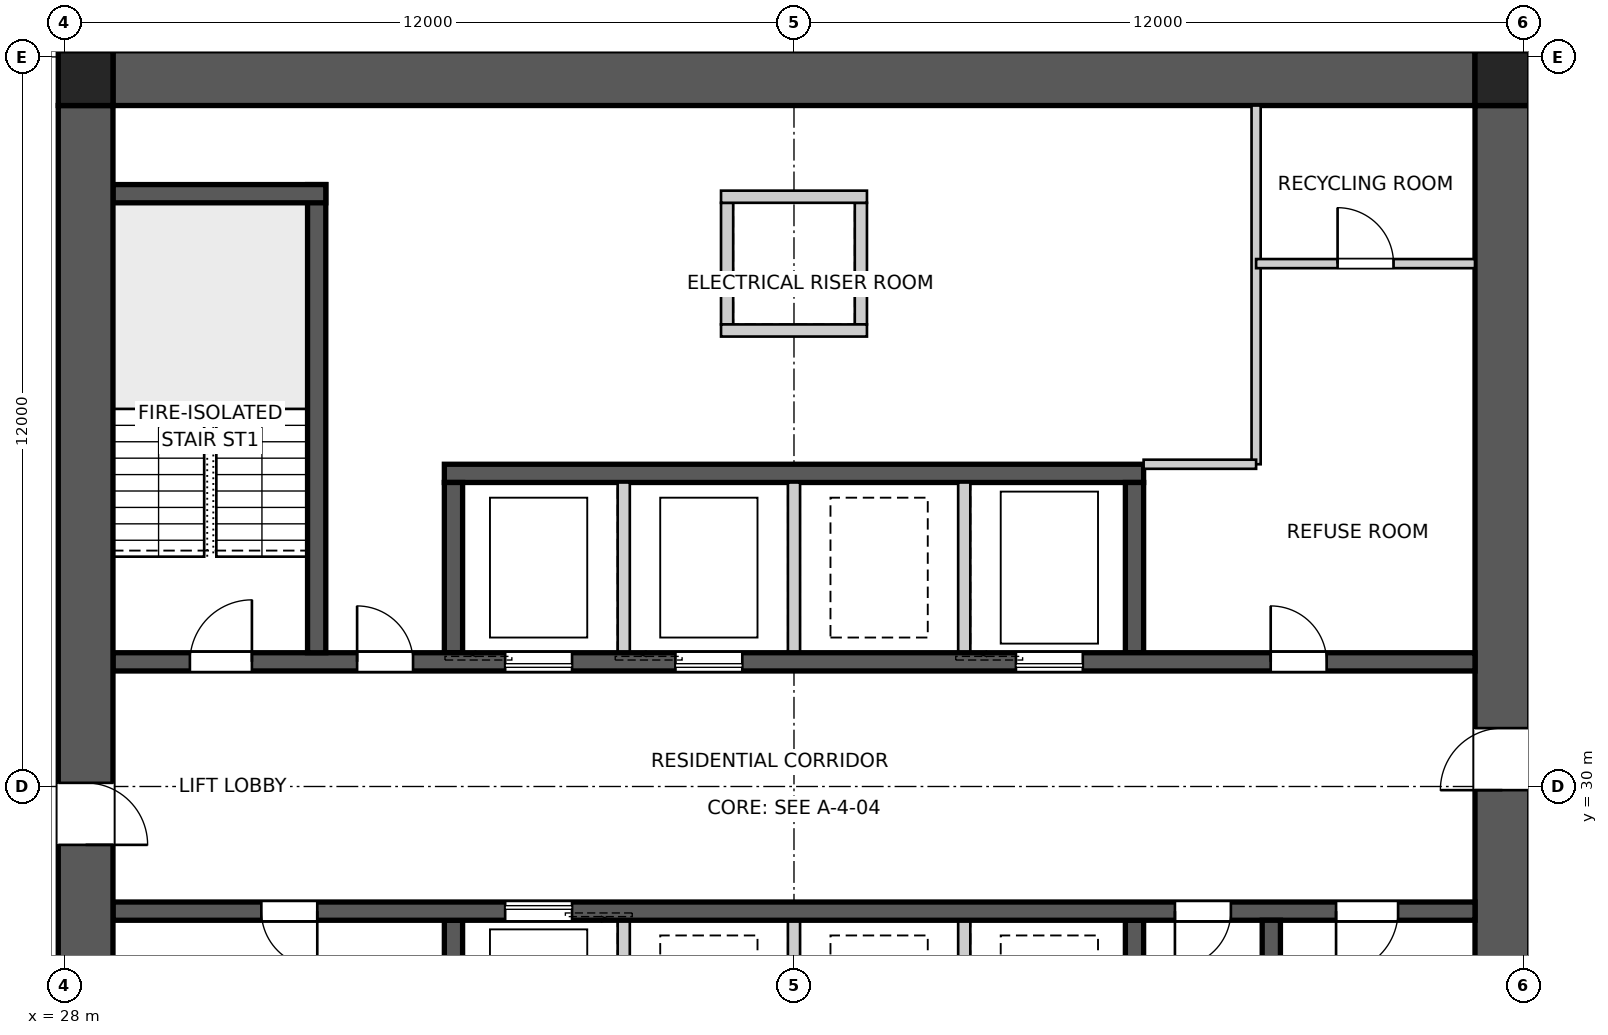
"""IFC4 building model, lengths in metres.
Left out: names, types, materials, properties, quantities, classifications, styles, units other than length and angle.
Written with IfcOpenShell. Run it as: python <this file> out.ifc"""

import sys

from ifc_helpers import new_model, si_unit, direction, frame, frame_2d, origin, origin_2d, place, context, subcontext, project, spatial, polyline, rectangle, outline, extrude, element, fill, save


model = new_model("IFC4")
c1 = context("Model", 3, precision=1e-05, world=origin(), true_north=direction((0.0, 1.0)))
c2 = subcontext(c1, "Body", "Model", "MODEL_VIEW")
j1 = project(units=[si_unit("LENGTHUNIT", "METRE"), si_unit("PLANEANGLEUNIT", "RADIAN")], contexts=[c1])
p1 = place(None, origin())
s1 = spatial("IfcSite", under=j1, at=p1, CompositionType="ELEMENT")
p2 = place(p1, origin())
s2 = spatial("IfcBuilding", under=s1, at=p2, CompositionType="ELEMENT")
p3 = place(p2, frame((0.0, 0.0, 67.6)))
s3 = spatial("IfcBuildingStorey", under=s2, at=p3, CompositionType="ELEMENT", Elevation=67.6)
p4 = place(p3, frame((28.8, 41.65, 0.0), z_axis=(0.0, 0.0, 1.0), x_axis=(1.0, 0.0, 0.0)))
e1 = element("IfcWall", 1, at=p4, inside=s3, PredefinedType="SHEAR", context=c2, shape_type="SweptSolid", body=[
    extrude(outline(polyline([(0.0, -0.45), (22.4, -0.45), (22.4, -0.025), (22.85, -0.025), (22.85, 0.025), (22.4, 0.025), (22.4, 0.45), (0.0, 0.45), (0.0, 0.025), (-0.45, 0.025), (-0.45, -0.025), (0.0, -0.025), (0.0, -0.45)])), origin(), (0.0, 0.0, 1.0), 3.4),
])
p5 = place(p3, frame((51.65, 18.8, 0.0), z_axis=(0.0, 0.0, 1.0), x_axis=(0.0, 1.0, 0.0)))
e2 = element("IfcWall", 2, at=p5, inside=s3, PredefinedType="SHEAR", context=c2, shape_type="SweptSolid", body=[
    extrude(outline(polyline([(0.0, -0.45), (22.4, -0.45), (22.4, -0.025), (22.85, -0.025), (22.85, 0.025), (22.4, 0.025), (22.4, 0.45), (0.0, 0.45), (0.0, 0.025), (-0.45, 0.025), (-0.45, -0.025), (0.0, -0.025), (0.0, -0.45)])), origin(), (0.0, 0.0, 1.0), 3.4),
])
p6 = place(p5, frame((11.14, 0.0, 0.0)))
e3 = element("IfcOpeningElement", 3, at=p6, cuts=e2, PredefinedType="OPENING", context=c2, shape_type="SweptSolid", body=[
    extrude(rectangle(XDim=1.02, YDim=2.4, at=frame_2d((0.51, 1.2))), frame((0.0, 0.46, 0.0), z_axis=(0.0, -1.0, 0.0), x_axis=(1.0, 0.0, 0.0)), (0.0, 0.0, 1.0), 0.92),
])
p7 = place(p3, frame((28.35, 41.2, 0.0), z_axis=(0.0, 0.0, 1.0), x_axis=(0.0, -1.0, 0.0)))
e4 = element("IfcWall", 4, at=p7, inside=s3, PredefinedType="SHEAR", context=c2, shape_type="SweptSolid", body=[
    extrude(outline(polyline([(0.0, -0.45), (22.4, -0.45), (22.4, -0.025), (22.85, -0.025), (22.85, 0.025), (22.4, 0.025), (22.4, 0.45), (0.0, 0.45), (0.0, 0.025), (-0.45, 0.025), (-0.45, -0.025), (0.0, -0.025), (0.0, -0.45)])), origin(), (0.0, 0.0, 1.0), 3.4),
])
p8 = place(p7, frame((11.14, 0.0, 0.0)))
e5 = element("IfcOpeningElement", 5, at=p8, cuts=e4, PredefinedType="OPENING", context=c2, shape_type="SweptSolid", body=[
    extrude(rectangle(XDim=1.02, YDim=2.4, at=frame_2d((0.51, 1.2))), frame((0.0, 0.46, 0.0), z_axis=(0.0, -1.0, 0.0), x_axis=(1.0, 0.0, 0.0)), (0.0, 0.0, 1.0), 0.92),
])
p9 = place(p3, frame((28.8, 32.05, 0.0), z_axis=(0.0, 0.0, 1.0), x_axis=(1.0, 0.0, 0.0)))
e6 = element("IfcWall", 6, at=p9, inside=s3, PredefinedType="SHEAR", context=c2, shape_type="SweptSolid", body=[
    extrude(rectangle(XDim=22.4, YDim=0.3, at=frame_2d((11.2, 0.0))), origin(), (0.0, 0.0, 1.0), 3.4),
])
p10 = place(p9, frame((19.04, 0.0, 0.0)))
e7 = element("IfcOpeningElement", 7, at=p10, cuts=e6, PredefinedType="OPENING", context=c2, shape_type="SweptSolid", body=[
    extrude(rectangle(XDim=0.92, YDim=2.1, at=frame_2d((0.46, 1.05))), frame((0.0, 0.16, 0.0), z_axis=(0.0, -1.0, 0.0), x_axis=(1.0, 0.0, 0.0)), (0.0, 0.0, 1.0), 0.32),
])
p11 = place(p9, frame((1.265, 0.0, 0.0)))
e8 = element("IfcOpeningElement", 8, at=p11, cuts=e6, PredefinedType="OPENING", context=c2, shape_type="SweptSolid", body=[
    extrude(rectangle(XDim=1.02, YDim=2.1, at=frame_2d((0.51, 1.05))), frame((0.0, 0.16, 0.0), z_axis=(0.0, -1.0, 0.0), x_axis=(1.0, 0.0, 0.0)), (0.0, 0.0, 1.0), 0.32),
])
p12 = place(p9, frame((4.015, 0.0, 0.0)))
e9 = element("IfcOpeningElement", 9, at=p12, cuts=e6, PredefinedType="OPENING", context=c2, shape_type="SweptSolid", body=[
    extrude(rectangle(XDim=0.92, YDim=2.1, at=frame_2d((0.46, 1.05))), frame((0.0, 0.16, 0.0), z_axis=(0.0, -1.0, 0.0), x_axis=(1.0, 0.0, 0.0)), (0.0, 0.0, 1.0), 0.32),
])
p13 = place(p9, frame((6.45, 0.0, 0.0)))
e10 = element("IfcOpeningElement", 10, at=p13, cuts=e6, PredefinedType="OPENING", context=c2, shape_type="SweptSolid", body=[
    extrude(rectangle(XDim=1.1, YDim=2.1, at=frame_2d((0.55, 1.05))), frame((0.0, 0.16, 0.0), z_axis=(0.0, -1.0, 0.0), x_axis=(1.0, 0.0, 0.0)), (0.0, 0.0, 1.0), 0.32),
])
p14 = place(p9, frame((9.25, 0.0, 0.0)))
e11 = element("IfcOpeningElement", 11, at=p14, cuts=e6, PredefinedType="OPENING", context=c2, shape_type="SweptSolid", body=[
    extrude(rectangle(XDim=1.1, YDim=2.1, at=frame_2d((0.55, 1.05))), frame((0.0, 0.16, 0.0), z_axis=(0.0, -1.0, 0.0), x_axis=(1.0, 0.0, 0.0)), (0.0, 0.0, 1.0), 0.32),
])
p15 = place(p9, frame((14.85, 0.0, 0.0)))
e12 = element("IfcOpeningElement", 12, at=p15, cuts=e6, PredefinedType="OPENING", context=c2, shape_type="SweptSolid", body=[
    extrude(rectangle(XDim=1.1, YDim=2.1, at=frame_2d((0.55, 1.05))), frame((0.0, 0.16, 0.0), z_axis=(0.0, -1.0, 0.0), x_axis=(1.0, 0.0, 0.0)), (0.0, 0.0, 1.0), 0.32),
])
p16 = place(p3, frame((51.2, 27.95, 0.0), z_axis=(0.0, 0.0, 1.0), x_axis=(-1.0, 0.0, 0.0)))
e13 = element("IfcWall", 13, at=p16, inside=s3, PredefinedType="SHEAR", context=c2, shape_type="SweptSolid", body=[
    extrude(rectangle(XDim=22.4, YDim=0.3, at=frame_2d((11.2, 0.0))), origin(), (0.0, 0.0, 1.0), 3.4),
])
p17 = place(p16, frame((19.04, 0.0, 0.0)))
e14 = element("IfcOpeningElement", 14, at=p17, cuts=e13, PredefinedType="OPENING", context=c2, shape_type="SweptSolid", body=[
    extrude(rectangle(XDim=0.92, YDim=2.1, at=frame_2d((0.46, 1.05))), frame((0.0, 0.16, 0.0), z_axis=(0.0, -1.0, 0.0), x_axis=(1.0, 0.0, 0.0)), (0.0, 0.0, 1.0), 0.32),
])
p18 = place(p16, frame((1.265, 0.0, 0.0)))
e15 = element("IfcOpeningElement", 15, at=p18, cuts=e13, PredefinedType="OPENING", context=c2, shape_type="SweptSolid", body=[
    extrude(rectangle(XDim=1.02, YDim=2.1, at=frame_2d((0.51, 1.05))), frame((0.0, 0.16, 0.0), z_axis=(0.0, -1.0, 0.0), x_axis=(1.0, 0.0, 0.0)), (0.0, 0.0, 1.0), 0.32),
])
p19 = place(p16, frame((4.015, 0.0, 0.0)))
e16 = element("IfcOpeningElement", 16, at=p19, cuts=e13, PredefinedType="OPENING", context=c2, shape_type="SweptSolid", body=[
    extrude(rectangle(XDim=0.92, YDim=2.1, at=frame_2d((0.46, 1.05))), frame((0.0, 0.16, 0.0), z_axis=(0.0, -1.0, 0.0), x_axis=(1.0, 0.0, 0.0)), (0.0, 0.0, 1.0), 0.32),
])
p20 = place(p16, frame((14.85, 0.0, 0.0)))
e17 = element("IfcOpeningElement", 17, at=p20, cuts=e13, PredefinedType="OPENING", context=c2, shape_type="SweptSolid", body=[
    extrude(rectangle(XDim=1.1, YDim=2.1, at=frame_2d((0.55, 1.05))), frame((0.0, 0.16, 0.0), z_axis=(0.0, -1.0, 0.0), x_axis=(1.0, 0.0, 0.0)), (0.0, 0.0, 1.0), 0.32),
])
p21 = place(p3, frame((34.25, 35.15, 0.0), z_axis=(0.0, 0.0, 1.0), x_axis=(1.0, 0.0, 0.0)))
e18 = element("IfcWall", 18, at=p21, inside=s3, PredefinedType="SHEAR", context=c2, shape_type="SweptSolid", body=[
    extrude(rectangle(XDim=11.5, YDim=0.3, at=frame_2d((5.75, 0.0))), origin(), (0.0, 0.0, 1.0), 3.4),
])
for number, where, z_axis, x_axis in (
    (19, (34.4, 32.2, 0.0), (0.0, 0.0, 1.0), (0.0, 1.0, 0.0)),
    (20, (45.6, 27.8, 0.0), (0.0, 0.0, 1.0), (0.0, -1.0, 0.0)),
):
    element("IfcWall", number, at=place(p3, frame(where, z_axis=z_axis, x_axis=x_axis)), inside=s3, PredefinedType="SHEAR", context=c2, shape_type="SweptSolid", body=[
        extrude(rectangle(XDim=2.8, YDim=0.3, at=frame_2d((1.4, 0.0))), origin(), (0.0, 0.0, 1.0), 3.4),
    ])
for number, where, z_axis, x_axis in (
    (21, (37.2, 32.2, 0.0), (0.0, 0.0, 1.0), (0.0, 1.0, 0.0)),
    (22, (42.8, 27.8, 0.0), (0.0, 0.0, 1.0), (0.0, -1.0, 0.0)),
    (23, (40.0, 32.2, 0.0), (0.0, 0.0, 1.0), (0.0, 1.0, 0.0)),
    (24, (40.0, 27.8, 0.0), (0.0, 0.0, 1.0), (0.0, -1.0, 0.0)),
    (25, (42.8, 32.2, 0.0), (0.0, 0.0, 1.0), (0.0, 1.0, 0.0)),
    (26, (37.2, 27.8, 0.0), (0.0, 0.0, 1.0), (0.0, -1.0, 0.0)),
):
    element("IfcWall", number, at=place(p3, frame(where, z_axis=z_axis, x_axis=x_axis)), inside=s3, PredefinedType="SOLIDWALL", context=c2, shape_type="SweptSolid", body=[
        extrude(rectangle(XDim=2.8, YDim=0.2, at=frame_2d((1.4, 0.0))), origin(), (0.0, 0.0, 1.0), 3.4),
    ])
for number, where, z_axis, x_axis in (
    (27, (45.6, 32.2, 0.0), (0.0, 0.0, 1.0), (0.0, 1.0, 0.0)),
    (28, (34.4, 27.8, 0.0), (0.0, 0.0, 1.0), (0.0, -1.0, 0.0)),
):
    element("IfcWall", number, at=place(p3, frame(where, z_axis=z_axis, x_axis=x_axis)), inside=s3, PredefinedType="SHEAR", context=c2, shape_type="SweptSolid", body=[
        extrude(rectangle(XDim=2.8, YDim=0.3, at=frame_2d((1.4, 0.0))), origin(), (0.0, 0.0, 1.0), 3.4),
    ])
p22 = place(p3, frame((32.15, 32.2, 0.0), z_axis=(0.0, 0.0, 1.0), x_axis=(0.0, 1.0, 0.0)))
e29 = element("IfcWall", 29, at=p22, inside=s3, PredefinedType="SHEAR", context=c2, shape_type="SweptSolid", body=[
    extrude(rectangle(XDim=7.7, YDim=0.3, at=frame_2d((3.85, 0.0))), origin(), (0.0, 0.0, 1.0), 3.4),
])
p23 = place(p3, frame((28.8, 39.75, 0.0), z_axis=(0.0, 0.0, 1.0), x_axis=(1.0, 0.0, 0.0)))
e30 = element("IfcWall", 30, at=p23, inside=s3, PredefinedType="SHEAR", context=c2, shape_type="SweptSolid", body=[
    extrude(rectangle(XDim=3.5, YDim=0.3, at=frame_2d((1.75, 0.0))), origin(), (0.0, 0.0, 1.0), 3.4),
])
p24 = place(p3, frame((47.85, 27.8, 0.0), z_axis=(0.0, 0.0, 1.0), x_axis=(0.0, -1.0, 0.0)))
e31 = element("IfcWall", 31, at=p24, inside=s3, PredefinedType="SHEAR", context=c2, shape_type="SweptSolid", body=[
    extrude(rectangle(XDim=7.7, YDim=0.3, at=frame_2d((3.85, 0.0))), origin(), (0.0, 0.0, 1.0), 3.4),
])
for number, where, z_axis, x_axis in (
    (32, (38.9, 37.6, 0.0), (0.0, 0.0, 1.0), (0.0, 1.0, 0.0)),
    (33, (41.1, 37.6, 0.0), (0.0, 0.0, 1.0), (0.0, 1.0, 0.0)),
):
    element("IfcWall", number, at=place(p3, frame(where, z_axis=z_axis, x_axis=x_axis)), inside=s3, PredefinedType="SOLIDWALL", context=c2, shape_type="SweptSolid", body=[
        extrude(rectangle(XDim=2.0, YDim=0.2, at=frame_2d((1.0, 0.0))), origin(), (0.0, 0.0, 1.0), 3.4),
    ])
for number, where, z_axis, x_axis in (
    (34, (38.8, 37.5, 0.0), (0.0, 0.0, 1.0), (1.0, 0.0, 0.0)),
    (35, (38.8, 39.7, 0.0), (0.0, 0.0, 1.0), (1.0, 0.0, 0.0)),
):
    element("IfcWall", number, at=place(p3, frame(where, z_axis=z_axis, x_axis=x_axis)), inside=s3, PredefinedType="SOLIDWALL", context=c2, shape_type="SweptSolid", body=[
        extrude(rectangle(XDim=2.4, YDim=0.2, at=frame_2d((1.2, 0.0))), origin(), (0.0, 0.0, 1.0), 3.4),
    ])
for number, where, z_axis, x_axis in (
    (36, (51.65, 41.65, 0.0), (0.0, 0.0, 1.0), (1.0, 0.0, 0.0)),
    (37, (28.35, 41.65, 0.0), (0.0, 0.0, 1.0), (1.0, 0.0, 0.0)),
):
    element("IfcColumn", number, at=place(p3, frame(where, z_axis=z_axis, x_axis=x_axis)), inside=s3, PredefinedType="COLUMN", context=c2, shape_type="SweptSolid", body=[
        extrude(rectangle(XDim=0.9, YDim=0.9, at=origin_2d()), origin(), (0.0, 0.0, 1.0), 3.4),
    ])
p25 = place(p3, frame((47.6, 41.2, 0.0), z_axis=(0.0, 0.0, 1.0), x_axis=(0.0, -1.0, 0.0)))
e38 = element("IfcWall", 38, at=p25, inside=s3, PredefinedType="SOLIDWALL", context=c2, shape_type="SweptSolid", body=[
    extrude(rectangle(XDim=5.9, YDim=0.15, at=frame_2d((2.95, 0.0))), origin(), (0.0, 0.0, 1.0), 3.25),
])
p26 = place(p3, frame((47.6, 35.3, 0.0), z_axis=(0.0, 0.0, 1.0), x_axis=(-1.0, 0.0, 0.0)))
e39 = element("IfcWall", 39, at=p26, inside=s3, PredefinedType="SOLIDWALL", context=c2, shape_type="SweptSolid", body=[
    extrude(rectangle(XDim=1.85, YDim=0.15, at=frame_2d((0.925, 0.0))), origin(), (0.0, 0.0, 1.0), 3.25),
])
p27 = place(p3, frame((47.6, 38.6, 0.0), z_axis=(0.0, 0.0, 1.0), x_axis=(1.0, 0.0, 0.0)))
e40 = element("IfcWall", 40, at=p27, inside=s3, PredefinedType="SOLIDWALL", context=c2, shape_type="SweptSolid", body=[
    extrude(rectangle(XDim=3.6, YDim=0.15, at=frame_2d((1.8, 0.0))), origin(), (0.0, 0.0, 1.0), 3.25),
])
p28 = place(p27, frame((1.34, 0.0, 0.0)))
e41 = element("IfcOpeningElement", 41, at=p28, cuts=e40, PredefinedType="OPENING", context=c2, shape_type="SweptSolid", body=[
    extrude(rectangle(XDim=0.92, YDim=2.1, at=frame_2d((0.46, 1.05))), frame((0.0, 0.085, 0.0), z_axis=(0.0, -1.0, 0.0), x_axis=(1.0, 0.0, 0.0)), (0.0, 0.0, 1.0), 0.17),
])
p29 = place(p10, origin())
e42 = element("IfcDoor", 42, at=p29, inside=s3, OperationType="SINGLE_SWING_LEFT", PredefinedType="DOOR", context=c2, shape_type="SweptSolid", body=[
    extrude(rectangle(XDim=0.92, YDim=2.1, at=frame_2d((0.46, 1.05))), frame((0.0, 0.025, 0.0), z_axis=(0.0, -1.0, 0.0), x_axis=(1.0, 0.0, 0.0)), (0.0, 0.0, 1.0), 0.05),
])
fill(e7, e42)
p30 = place(p17, origin())
e43 = element("IfcDoor", 43, at=p30, inside=s3, OperationType="SINGLE_SWING_LEFT", PredefinedType="DOOR", context=c2, shape_type="SweptSolid", body=[
    extrude(rectangle(XDim=0.92, YDim=2.1, at=frame_2d((0.46, 1.05))), frame((0.0, 0.025, 0.0), z_axis=(0.0, -1.0, 0.0), x_axis=(1.0, 0.0, 0.0)), (0.0, 0.0, 1.0), 0.05),
])
fill(e14, e43)
p31 = place(p18, origin())
e44 = element("IfcDoor", 44, at=p31, inside=s3, OperationType="SINGLE_SWING_RIGHT", PredefinedType="DOOR", context=c2, shape_type="SweptSolid", body=[
    extrude(rectangle(XDim=1.02, YDim=2.1, at=frame_2d((0.51, 1.05))), frame((0.0, 0.025, 0.0), z_axis=(0.0, -1.0, 0.0), x_axis=(1.0, 0.0, 0.0)), (0.0, 0.0, 1.0), 0.05),
])
fill(e15, e44)
p32 = place(p11, origin())
e45 = element("IfcDoor", 45, at=p32, inside=s3, OperationType="SINGLE_SWING_RIGHT", PredefinedType="DOOR", context=c2, shape_type="SweptSolid", body=[
    extrude(rectangle(XDim=1.02, YDim=2.1, at=frame_2d((0.51, 1.05))), frame((0.0, 0.025, 0.0), z_axis=(0.0, -1.0, 0.0), x_axis=(1.0, 0.0, 0.0)), (0.0, 0.0, 1.0), 0.05),
])
fill(e8, e45)
p33 = place(p12, origin())
e46 = element("IfcDoor", 46, at=p33, inside=s3, OperationType="SINGLE_SWING_LEFT", PredefinedType="DOOR", context=c2, shape_type="SweptSolid", body=[
    extrude(rectangle(XDim=0.92, YDim=2.1, at=frame_2d((0.46, 1.05))), frame((0.0, 0.025, 0.0), z_axis=(0.0, -1.0, 0.0), x_axis=(1.0, 0.0, 0.0)), (0.0, 0.0, 1.0), 0.05),
])
fill(e9, e46)
p34 = place(p19, origin())
e47 = element("IfcDoor", 47, at=p34, inside=s3, OperationType="SINGLE_SWING_RIGHT", PredefinedType="DOOR", context=c2, shape_type="SweptSolid", body=[
    extrude(rectangle(XDim=0.92, YDim=2.1, at=frame_2d((0.46, 1.05))), frame((0.0, 0.025, 0.0), z_axis=(0.0, -1.0, 0.0), x_axis=(1.0, 0.0, 0.0)), (0.0, 0.0, 1.0), 0.05),
])
fill(e16, e47)
p35 = place(p28, origin())
e48 = element("IfcDoor", 48, at=p35, inside=s3, OperationType="SINGLE_SWING_LEFT", PredefinedType="DOOR", context=c2, shape_type="SweptSolid", body=[
    extrude(rectangle(XDim=0.92, YDim=2.1, at=frame_2d((0.46, 1.05))), frame((0.0, 0.025, 0.0), z_axis=(0.0, -1.0, 0.0), x_axis=(1.0, 0.0, 0.0)), (0.0, 0.0, 1.0), 0.05),
])
fill(e41, e48)
p36 = place(p6, origin())
e49 = element("IfcDoor", 49, at=p36, inside=s3, OperationType="SINGLE_SWING_LEFT", PredefinedType="DOOR", context=c2, shape_type="SweptSolid", body=[
    extrude(rectangle(XDim=1.02, YDim=2.4, at=frame_2d((0.51, 1.2))), frame((0.0, 0.025, 0.0), z_axis=(0.0, -1.0, 0.0), x_axis=(1.0, 0.0, 0.0)), (0.0, 0.0, 1.0), 0.05),
])
fill(e3, e49)
p37 = place(p8, origin())
e50 = element("IfcDoor", 50, at=p37, inside=s3, OperationType="SINGLE_SWING_RIGHT", PredefinedType="DOOR", context=c2, shape_type="SweptSolid", body=[
    extrude(rectangle(XDim=1.02, YDim=2.4, at=frame_2d((0.51, 1.2))), frame((0.0, 0.025, 0.0), z_axis=(0.0, -1.0, 0.0), x_axis=(1.0, 0.0, 0.0)), (0.0, 0.0, 1.0), 0.05),
])
fill(e5, e50)
p38 = place(p13, origin())
e51 = element("IfcDoor", 51, at=p38, inside=s3, OperationType="SLIDING_TO_LEFT", PredefinedType="DOOR", context=c2, shape_type="SweptSolid", body=[
    extrude(rectangle(XDim=1.1, YDim=2.1, at=frame_2d((0.55, 1.05))), frame((0.0, 0.025, 0.0), z_axis=(0.0, -1.0, 0.0), x_axis=(1.0, 0.0, 0.0)), (0.0, 0.0, 1.0), 0.05),
])
fill(e10, e51)
p39 = place(p14, origin())
e52 = element("IfcDoor", 52, at=p39, inside=s3, OperationType="SLIDING_TO_LEFT", PredefinedType="DOOR", context=c2, shape_type="SweptSolid", body=[
    extrude(rectangle(XDim=1.1, YDim=2.1, at=frame_2d((0.55, 1.05))), frame((0.0, 0.025, 0.0), z_axis=(0.0, -1.0, 0.0), x_axis=(1.0, 0.0, 0.0)), (0.0, 0.0, 1.0), 0.05),
])
fill(e11, e52)
p40 = place(p15, origin())
e53 = element("IfcDoor", 53, at=p40, inside=s3, OperationType="SLIDING_TO_LEFT", PredefinedType="DOOR", context=c2, shape_type="SweptSolid", body=[
    extrude(rectangle(XDim=1.1, YDim=2.1, at=frame_2d((0.55, 1.05))), frame((0.0, 0.025, 0.0), z_axis=(0.0, -1.0, 0.0), x_axis=(1.0, 0.0, 0.0)), (0.0, 0.0, 1.0), 0.05),
])
fill(e12, e53)
p41 = place(p20, origin())
e54 = element("IfcDoor", 54, at=p41, inside=s3, OperationType="SLIDING_TO_LEFT", PredefinedType="DOOR", context=c2, shape_type="SweptSolid", body=[
    extrude(rectangle(XDim=1.1, YDim=2.1, at=frame_2d((0.55, 1.05))), frame((0.0, 0.025, 0.0), z_axis=(0.0, -1.0, 0.0), x_axis=(1.0, 0.0, 0.0)), (0.0, 0.0, 1.0), 0.05),
])
fill(e17, e54)
save(model, sys.argv[1])
